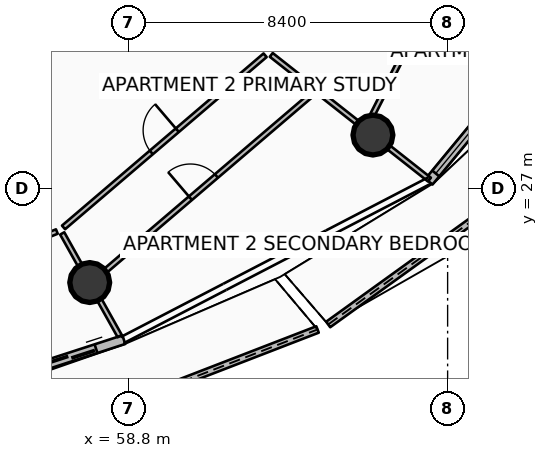
"""IFC4 building model, lengths in metres.
Left out: names, types, materials, properties, quantities, classifications, styles, units other than length and angle.
Written with IfcOpenShell. Run it as: python <this file> out.ifc"""

import sys

from ifc_helpers import new_model, si_unit, direction, frame, frame_2d, origin, origin_2d, place, context, subcontext, project, spatial, polyline, rectangle, circle, outline, extrude, element, fill, save


model = new_model("IFC4")
c1 = context("Model", 3, precision=1e-05, world=origin(), true_north=direction((0.0, 1.0)))
c2 = subcontext(c1, "Body", "Model", "MODEL_VIEW")
j1 = project(units=[si_unit("LENGTHUNIT", "METRE"), si_unit("PLANEANGLEUNIT", "RADIAN")], contexts=[c1])
p1 = place(None, origin())
s1 = spatial("IfcSite", under=j1, at=p1, CompositionType="ELEMENT")
p2 = place(p1, origin())
s2 = spatial("IfcBuilding", under=s1, at=p2, CompositionType="ELEMENT")
p3 = place(p2, frame((0.0, 0.0, 150.3)))
s3 = spatial("IfcBuildingStorey", under=s2, at=p3, CompositionType="ELEMENT", Elevation=150.3)
for number, where, z_axis, x_axis in (
    (1, (57.782, 24.533, 0.0), (0.0, 0.0, 1.0), (1.0, 0.0, 0.0)),
    (2, (65.234, 28.414, 0.0), (0.0, 0.0, 1.0), (1.0, 0.0, 0.0)),
):
    element("IfcColumn", number, at=place(p3, frame(where, z_axis=z_axis, x_axis=x_axis)), inside=s3, PredefinedType="COLUMN", context=c2, shape_type="SweptSolid", body=[
        extrude(circle(Radius=0.525, at=origin_2d()), origin(), (0.0, 0.0, 1.0), 3.5),
    ])
p4 = place(p3, frame((55.271, 20.01, 0.0), z_axis=(0.0, 0.0, 1.0), x_axis=(0.932748827034, 0.360526872322, 0.0)))
e3 = element("IfcWall", 3, at=p4, inside=s3, PredefinedType="PARAPET", context=c2, shape_type="SweptSolid", body=[
    extrude(outline(polyline([(0.0, 0.0), (9.119, 0.0), (9.119, 1.224), (4.56, 1.127), (0.0, 1.148), (0.0, 0.0)])), frame((0.0, 0.09, 0.0), z_axis=(0.0, -1.0, 0.0), x_axis=(1.0, 0.0, 0.0)), (0.0, 0.0, 1.0), 0.18),
])
p5 = place(p3, frame((64.058, 23.43, 0.0), z_axis=(0.0, 0.0, 1.0), x_axis=(0.811363748486, 0.584541587608, 0.0)))
e4 = element("IfcWall", 4, at=p5, inside=s3, PredefinedType="PARAPET", context=c2, shape_type="SweptSolid", body=[
    extrude(outline(polyline([(0.0, 0.0), (10.29, 0.0), (10.29, 1.632), (5.145, 1.418), (0.0, 1.233), (0.0, 0.0)])), frame((0.0, 0.09, 0.0), z_axis=(0.0, -1.0, 0.0), x_axis=(1.0, 0.0, 0.0)), (0.0, 0.0, 1.0), 0.18),
])
p6 = place(p3, frame((50.51, 20.376, 0.0), z_axis=(0.0, 0.0, 1.0), x_axis=(0.951046390632, 0.309048156224, 0.0)))
e5 = element("IfcWall", 5, at=p6, inside=s3, PredefinedType="SOLIDWALL", context=c2, shape_type="SweptSolid", body=[
    extrude(rectangle(XDim=8.59, YDim=0.24, at=frame_2d((4.295, 0.0))), origin(), (0.0, 0.0, 1.0), 2.45),
])
p7 = place(p6, frame((6.37, 0.0, 0.0)))
e6 = element("IfcOpeningElement", 6, at=p7, cuts=e5, PredefinedType="OPENING", context=c2, shape_type="SweptSolid", body=[
    extrude(rectangle(XDim=1.45, YDim=2.15, at=frame_2d((0.725, 1.075))), frame((0.0, 0.13, 0.0), z_axis=(0.0, -1.0, 0.0), x_axis=(1.0, 0.0, 0.0)), (0.0, 0.0, 1.0), 0.26),
])
p8 = place(p6, frame((0.28, 0.0, 0.65)))
e7 = element("IfcOpeningElement", 7, at=p8, cuts=e5, PredefinedType="OPENING", context=c2, shape_type="SweptSolid", body=[
    extrude(rectangle(XDim=1.6, YDim=1.5, at=frame_2d((0.8, 0.75))), frame((0.0, 0.13, 0.0), z_axis=(0.0, -1.0, 0.0), x_axis=(1.0, 0.0, 0.0)), (0.0, 0.0, 1.0), 0.26),
])
p9 = place(p3, frame((66.709, 27.187, 0.0), z_axis=(0.0, 0.0, 1.0), x_axis=(0.636771922292, 0.77105221547, 0.0)))
e8 = element("IfcWall", 8, at=p9, inside=s3, PredefinedType="SOLIDWALL", context=c2, shape_type="SweptSolid", body=[
    extrude(rectangle(XDim=10.082, YDim=0.24, at=frame_2d((5.041, 0.0))), origin(), (0.0, 0.0, 1.0), 2.45),
])
p10 = place(p9, frame((7.862, 0.0, 0.0)))
e9 = element("IfcOpeningElement", 9, at=p10, cuts=e8, PredefinedType="OPENING", context=c2, shape_type="SweptSolid", body=[
    extrude(rectangle(XDim=1.45, YDim=2.15, at=frame_2d((0.725, 1.075))), frame((0.0, 0.13, 0.0), z_axis=(0.0, -1.0, 0.0), x_axis=(1.0, 0.0, 0.0)), (0.0, 0.0, 1.0), 0.26),
])
p11 = place(p9, frame((0.28, 0.0, 0.65)))
e10 = element("IfcOpeningElement", 10, at=p11, cuts=e8, PredefinedType="OPENING", context=c2, shape_type="SweptSolid", body=[
    extrude(rectangle(XDim=1.6, YDim=1.5, at=frame_2d((0.8, 0.75))), frame((0.0, 0.13, 0.0), z_axis=(0.0, -1.0, 0.0), x_axis=(1.0, 0.0, 0.0)), (0.0, 0.0, 1.0), 0.26),
])
p12 = place(p3, frame((52.753, 24.196, 0.0), z_axis=(0.0, 0.0, 1.0), x_axis=(0.927460636041, 0.373920805243, 0.0)))
e11 = element("IfcWall", 11, at=p12, inside=s3, PredefinedType="PARTITIONING", context=c2, shape_type="SweptSolid", body=[
    extrude(rectangle(XDim=4.49, YDim=0.125, at=frame_2d((2.245, 0.0))), origin(), (0.0, 0.0, 1.0), 2.94),
])
p13 = place(p12, frame((1.795, 0.0, 0.0)))
e12 = element("IfcOpeningElement", 12, at=p13, cuts=e11, PredefinedType="OPENING", context=c2, shape_type="SweptSolid", body=[
    extrude(rectangle(XDim=0.9, YDim=2.08, at=frame_2d((0.45, 1.04))), frame((0.0, 0.073, 0.0), z_axis=(0.0, -1.0, 0.0), x_axis=(1.0, 0.0, 0.0)), (0.0, 0.0, 1.0), 0.145),
])
p14 = place(p3, frame((57.059, 25.825, 0.0), z_axis=(0.0, 0.0, 1.0), x_axis=(0.488620181058, -0.872496600946, 0.0)))
e13 = element("IfcWall", 13, at=p14, inside=s3, PredefinedType="PARTITIONING", context=c2, shape_type="SweptSolid", body=[
    extrude(rectangle(XDim=3.095, YDim=0.125, at=frame_2d((1.548, 0.0))), origin(), (0.0, 0.0, 1.0), 2.94),
])
p15 = place(p3, frame((57.093, 25.983, 0.0), z_axis=(0.0, 0.0, 1.0), x_axis=(0.76040680935, 0.649447060425, 0.0)))
e14 = element("IfcWall", 14, at=p15, inside=s3, PredefinedType="PARTITIONING", context=c2, shape_type="SweptSolid", body=[
    extrude(rectangle(XDim=6.975, YDim=0.125, at=frame_2d((3.487, 0.0))), origin(), (0.0, 0.0, 1.0), 2.94),
])
p16 = place(p15, frame((3.037, 0.0, 0.0)))
e15 = element("IfcOpeningElement", 15, at=p16, cuts=e14, PredefinedType="OPENING", context=c2, shape_type="SweptSolid", body=[
    extrude(rectangle(XDim=0.9, YDim=2.08, at=frame_2d((0.45, 1.04))), frame((0.0, 0.073, 0.0), z_axis=(0.0, -1.0, 0.0), x_axis=(1.0, 0.0, 0.0)), (0.0, 0.0, 1.0), 0.145),
])
p17 = place(p3, frame((57.882, 24.574, 0.0), z_axis=(0.0, 0.0, 1.0), x_axis=(0.760417937401, 0.649434030891, 0.0)))
e16 = element("IfcWall", 16, at=p17, inside=s3, PredefinedType="PARTITIONING", context=c2, shape_type="SweptSolid", body=[
    extrude(rectangle(XDim=7.605, YDim=0.125, at=frame_2d((3.802, 0.0))), origin(), (0.0, 0.0, 1.0), 2.94),
])
p18 = place(p17, frame((3.352, 0.0, 0.0)))
e17 = element("IfcOpeningElement", 17, at=p18, cuts=e16, PredefinedType="OPENING", context=c2, shape_type="SweptSolid", body=[
    extrude(rectangle(XDim=0.9, YDim=2.08, at=frame_2d((0.45, 1.04))), frame((0.0, 0.073, 0.0), z_axis=(0.0, -1.0, 0.0), x_axis=(1.0, 0.0, 0.0)), (0.0, 0.0, 1.0), 0.145),
])
p19 = place(p3, frame((62.559, 30.523, 0.0), z_axis=(0.0, 0.0, 1.0), x_axis=(0.785319981095, -0.619090080112, 0.0)))
e18 = element("IfcWall", 18, at=p19, inside=s3, PredefinedType="PARTITIONING", context=c2, shape_type="SweptSolid", body=[
    extrude(rectangle(XDim=5.301, YDim=0.125, at=frame_2d((2.65, 0.0))), origin(), (0.0, 0.0, 1.0), 2.94),
])
p20 = place(p3, frame((65.082, 28.671, 0.0), z_axis=(0.0, 0.0, 1.0), x_axis=(0.454001657521, 0.891000838927, 0.0)))
e19 = element("IfcWall", 19, at=p20, inside=s3, PredefinedType="PARTITIONING", context=c2, shape_type="SweptSolid", body=[
    extrude(rectangle(XDim=8.242, YDim=0.125, at=frame_2d((4.121, 0.0))), origin(), (0.0, 0.0, 1.0), 2.94),
])
p21 = place(p20, frame((3.671, 0.0, 0.0)))
e20 = element("IfcOpeningElement", 20, at=p21, cuts=e19, PredefinedType="OPENING", context=c2, shape_type="SweptSolid", body=[
    extrude(rectangle(XDim=0.9, YDim=2.08, at=frame_2d((0.45, 1.04))), frame((0.0, 0.073, 0.0), z_axis=(0.0, -1.0, 0.0), x_axis=(1.0, 0.0, 0.0)), (0.0, 0.0, 1.0), 0.145),
])
p22 = place(p7, origin())
e21 = element("IfcDoor", 21, at=p22, inside=s3, OperationType="DOUBLE_DOOR_SLIDING", PredefinedType="DOOR", context=c2, shape_type="SweptSolid", body=[
    extrude(rectangle(XDim=1.45, YDim=2.15, at=frame_2d((0.725, 1.075))), frame((0.0, 0.025, 0.0), z_axis=(0.0, -1.0, 0.0), x_axis=(1.0, 0.0, 0.0)), (0.0, 0.0, 1.0), 0.05),
])
fill(e6, e21)
p23 = place(p11, origin())
e22 = element("IfcWindow", 22, at=p23, inside=s3, PartitioningType="SINGLE_PANEL", PredefinedType="WINDOW", context=c2, shape_type="SweptSolid", body=[
    extrude(rectangle(XDim=1.6, YDim=1.5, at=frame_2d((0.8, 0.75))), frame((0.0, 0.03, 0.0), z_axis=(0.0, -1.0, 0.0), x_axis=(1.0, 0.0, 0.0)), (0.0, 0.0, 1.0), 0.06),
])
fill(e10, e22)
p24 = place(p16, origin())
e23 = element("IfcDoor", 23, at=p24, inside=s3, OperationType="SINGLE_SWING_RIGHT", PredefinedType="DOOR", context=c2, shape_type="SweptSolid", body=[
    extrude(rectangle(XDim=0.9, YDim=2.08, at=frame_2d((0.45, 1.04))), frame((0.0, 0.025, 0.0), z_axis=(0.0, -1.0, 0.0), x_axis=(1.0, 0.0, 0.0)), (0.0, 0.0, 1.0), 0.05),
])
fill(e15, e23)
p25 = place(p18, origin())
e24 = element("IfcDoor", 24, at=p25, inside=s3, OperationType="SINGLE_SWING_LEFT", PredefinedType="DOOR", context=c2, shape_type="SweptSolid", body=[
    extrude(rectangle(XDim=0.9, YDim=2.08, at=frame_2d((0.45, 1.04))), frame((0.0, 0.025, 0.0), z_axis=(0.0, -1.0, 0.0), x_axis=(1.0, 0.0, 0.0)), (0.0, 0.0, 1.0), 0.05),
])
fill(e17, e24)
save(model, sys.argv[1])
